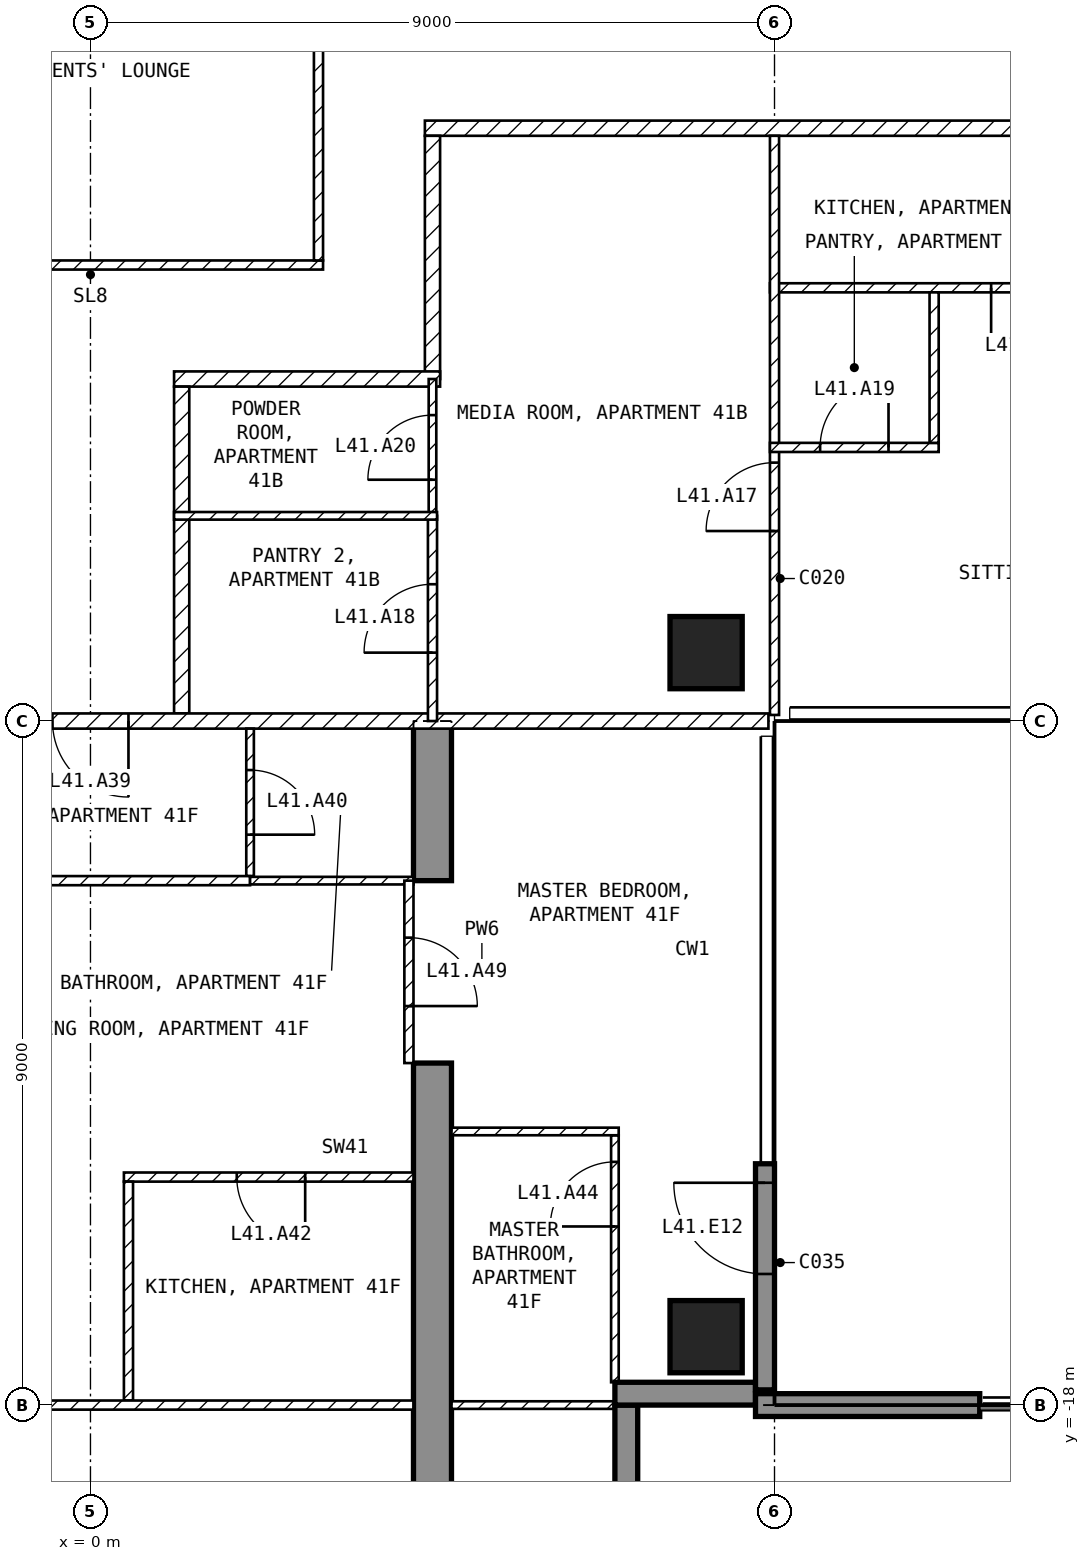
"""IFC4 building model, lengths in metres.
Left out: names, types, materials, properties, quantities, classifications, styles, units other than length and angle.
Written with IfcOpenShell. Run it as: python <this file> out.ifc"""

import sys

from ifc_helpers import new_model, si_unit, direction, frame, frame_2d, origin, origin_2d, place, context, subcontext, project, spatial, polyline, rectangle, outline, extrude, element, fill, save


model = new_model("IFC4")
c1 = context("Model", 3, precision=1e-05, world=origin(), true_north=direction((0.0, 1.0)))
c2 = subcontext(c1, "Body", "Model", "MODEL_VIEW")
j1 = project(units=[si_unit("LENGTHUNIT", "METRE"), si_unit("PLANEANGLEUNIT", "RADIAN")], contexts=[c1])
p1 = place(None, origin())
s1 = spatial("IfcSite", under=j1, at=p1, CompositionType="ELEMENT")
p2 = place(p1, origin())
s2 = spatial("IfcBuilding", under=s1, at=p2, CompositionType="ELEMENT")
p3 = place(p2, frame((0.0, 0.0, 170.1)))
s3 = spatial("IfcBuildingStorey", under=s2, at=p3, CompositionType="ELEMENT", Elevation=170.1)
for number, where, z_axis, x_axis in (
    (1, (8.1, -17.1, -0.25), (0.0, 0.0, 1.0), (1.0, 0.0, 0.0)),
    (2, (8.1, -8.1, -0.25), (0.0, 0.0, 1.0), (1.0, 0.0, 0.0)),
):
    element("IfcColumn", number, at=place(p3, frame(where, z_axis=z_axis, x_axis=x_axis)), inside=s3, PredefinedType="COLUMN", context=c2, shape_type="SweptSolid", body=[
        extrude(rectangle(XDim=0.95, YDim=0.95, at=origin_2d()), origin(), (0.0, 0.0, 1.0), 3.5),
    ])
p4 = place(p3, frame((4.25, -20.225, -0.25), z_axis=(1.0, 0.0, 0.0), x_axis=(0.0, 1.0, 0.0)))
e3 = element("IfcWall", 3, at=p4, inside=s3, PredefinedType="SHEAR", context=c2, shape_type="SweptSolid", body=[
    extrude(outline(polyline([(0.0, 0.0), (6.725, 0.0), (6.725, 2.65), (9.125, 2.65), (9.125, 0.0), (11.225, 0.0), (11.225, 3.5), (0.0, 3.5), (0.0, 0.0)])), origin(), (0.0, 0.0, 1.0), 0.5),
])
p5 = place(p3, frame((8.875, -17.8, 0.0), z_axis=(0.0, 0.0, 1.0), x_axis=(0.0, 1.0, 0.0)))
e4 = element("IfcWall", 4, at=p5, inside=s3, PredefinedType="SOLIDWALL", context=c2, shape_type="SweptSolid", body=[
    extrude(rectangle(XDim=2.975, YDim=0.25, at=frame_2d((1.488, 0.0))), origin(), (0.0, 0.0, 1.0), 3.25),
])
p6 = place(p5, frame((1.525, 0.0, 0.0)))
e5 = element("IfcOpeningElement", 5, at=p6, cuts=e4, PredefinedType="OPENING", context=c2, shape_type="SweptSolid", body=[
    extrude(rectangle(XDim=1.2, YDim=2.4, at=frame_2d((0.6, 1.2))), frame((0.0, 0.135, 0.0), z_axis=(0.0, -1.0, 0.0), x_axis=(1.0, 0.0, 0.0)), (0.0, 0.0, 1.0), 0.27),
])
p7 = place(p3, frame((7.05, -19.8, 0.0), z_axis=(0.0, 0.0, 1.0), x_axis=(0.0, 1.0, 0.0)))
e6 = element("IfcWall", 6, at=p7, inside=s3, PredefinedType="SOLIDWALL", context=c2, shape_type="SweptSolid", body=[
    extrude(rectangle(XDim=1.8, YDim=0.3, at=frame_2d((0.9, 0.0))), origin(), (0.0, 0.0, 1.0), 3.25),
])
p8 = place(p3, frame((6.9, -17.85, 0.0), z_axis=(0.0, 0.0, 1.0), x_axis=(1.0, 0.0, 0.0)))
e7 = element("IfcWall", 7, at=p8, inside=s3, PredefinedType="SOLIDWALL", context=c2, shape_type="SweptSolid", body=[
    extrude(rectangle(XDim=1.85, YDim=0.3, at=frame_2d((0.925, 0.0))), origin(), (0.0, 0.0, 1.0), 3.25),
])
p9 = place(p3, frame((8.75, -18.0, 0.0), z_axis=(0.0, 0.0, 1.0), x_axis=(1.0, 0.0, 0.0)))
e8 = element("IfcWall", 8, at=p9, inside=s3, PredefinedType="SOLIDWALL", context=c2, shape_type="SweptSolid", body=[
    extrude(rectangle(XDim=2.95, YDim=0.3, at=frame_2d((1.475, 0.0))), origin(), (0.0, 0.0, 1.0), 3.25),
])
p10 = place(p3, frame((-3.06, -3.0, 0.0), z_axis=(0.0, 0.0, 1.0), x_axis=(1.0, 0.0, 0.0)))
e9 = element("IfcWall", 9, at=p10, inside=s3, PredefinedType="PARTITIONING", context=c2, shape_type="SweptSolid", body=[
    extrude(rectangle(XDim=6.12, YDim=0.12, at=frame_2d((3.06, 0.0))), origin(), (0.0, 0.0, 1.0), 3.25),
])
p11 = place(p3, frame((3.0, -2.94, 0.0), z_axis=(0.0, 0.0, 1.0), x_axis=(0.0, 1.0, 0.0)))
e10 = element("IfcWall", 10, at=p11, inside=s3, PredefinedType="PARTITIONING", context=c2, shape_type="SweptSolid", body=[
    extrude(rectangle(XDim=5.88, YDim=0.12, at=frame_2d((2.94, 0.0))), origin(), (0.0, 0.0, 1.0), 3.25),
])
p12 = place(p3, frame((21.6, -1.2, 0.0), z_axis=(0.0, 0.0, 1.0), x_axis=(-1.0, 0.0, 0.0)))
e11 = element("IfcWall", 11, at=p12, inside=s3, PredefinedType="PARTITIONING", context=c2, shape_type="SweptSolid", body=[
    extrude(rectangle(XDim=17.2, YDim=0.2, at=frame_2d((8.6, 0.0))), origin(), (0.0, 0.0, 1.0), 3.25),
])
p13 = place(p12, frame((3.625, 0.0, 0.0)))
e12 = element("IfcOpeningElement", 12, at=p13, cuts=e11, PredefinedType="OPENING", context=c2, shape_type="SweptSolid", body=[
    extrude(rectangle(XDim=1.0, YDim=2.1, at=frame_2d((0.5, 1.05))), frame((0.0, 0.11, 0.0), z_axis=(0.0, -1.0, 0.0), x_axis=(1.0, 0.0, 0.0)), (0.0, 0.0, 1.0), 0.22),
])
p14 = place(p3, frame((4.5, -1.3, 0.0), z_axis=(0.0, 0.0, 1.0), x_axis=(0.0, -1.0, 0.0)))
e13 = element("IfcWall", 13, at=p14, inside=s3, PredefinedType="PARTITIONING", context=c2, shape_type="SweptSolid", body=[
    extrude(rectangle(XDim=3.2, YDim=0.2, at=frame_2d((1.6, 0.0))), origin(), (0.0, 0.0, 1.0), 3.25),
])
p15 = place(p3, frame((4.6, -4.5, 0.0), z_axis=(0.0, 0.0, 1.0), x_axis=(-1.0, 0.0, 0.0)))
e14 = element("IfcWall", 14, at=p15, inside=s3, PredefinedType="PARTITIONING", context=c2, shape_type="SweptSolid", body=[
    extrude(rectangle(XDim=3.5, YDim=0.2, at=frame_2d((1.75, 0.0))), origin(), (0.0, 0.0, 1.0), 3.25),
])
p16 = place(p3, frame((1.2, -4.6, 0.0), z_axis=(0.0, 0.0, 1.0), x_axis=(0.0, -1.0, 0.0)))
e15 = element("IfcWall", 15, at=p16, inside=s3, PredefinedType="PARTITIONING", context=c2, shape_type="SweptSolid", body=[
    extrude(rectangle(XDim=4.3, YDim=0.2, at=frame_2d((2.15, 0.0))), origin(), (0.0, 0.0, 1.0), 3.25),
])
p17 = place(p3, frame((8.92, -9.0, 0.0), z_axis=(0.0, 0.0, 1.0), x_axis=(-1.0, 0.0, 0.0)))
e16 = element("IfcWall", 16, at=p17, inside=s3, PredefinedType="PARTITIONING", context=c2, shape_type="SweptSolid", body=[
    extrude(rectangle(XDim=17.84, YDim=0.2, at=frame_2d((8.92, 0.0))), origin(), (0.0, 0.0, 1.0), 3.25),
])
p18 = place(p17, frame((8.42, 0.0, 0.0)))
e17 = element("IfcOpeningElement", 17, at=p18, cuts=e16, PredefinedType="OPENING", context=c2, shape_type="SweptSolid", body=[
    extrude(rectangle(XDim=1.0, YDim=2.1, at=frame_2d((0.5, 1.05))), frame((0.0, 0.11, 0.0), z_axis=(0.0, -1.0, 0.0), x_axis=(1.0, 0.0, 0.0)), (0.0, 0.0, 1.0), 0.22),
])
p19 = place(p3, frame((18.75, -3.3, 0.0), z_axis=(0.0, 0.0, 1.0), x_axis=(-1.0, 0.0, 0.0)))
e18 = element("IfcWall", 18, at=p19, inside=s3, PredefinedType="PARTITIONING", context=c2, shape_type="SweptSolid", body=[
    extrude(rectangle(XDim=9.81, YDim=0.12, at=frame_2d((4.905, 0.0))), origin(), (0.0, 0.0, 1.0), 3.25),
])
p20 = place(p19, frame((6.0, 0.0, 0.0)))
e19 = element("IfcOpeningElement", 19, at=p20, cuts=e18, PredefinedType="OPENING", context=c2, shape_type="SweptSolid", body=[
    extrude(rectangle(XDim=0.9, YDim=2.1, at=frame_2d((0.45, 1.05))), frame((0.0, 0.07, 0.0), z_axis=(0.0, -1.0, 0.0), x_axis=(1.0, 0.0, 0.0)), (0.0, 0.0, 1.0), 0.14),
])
p21 = place(p19, frame((1.2, 0.0, 0.0)))
e20 = element("IfcOpeningElement", 20, at=p21, cuts=e18, PredefinedType="OPENING", context=c2, shape_type="SweptSolid", body=[
    extrude(rectangle(XDim=0.9, YDim=2.1, at=frame_2d((0.45, 1.05))), frame((0.0, 0.07, 0.0), z_axis=(0.0, -1.0, 0.0), x_axis=(1.0, 0.0, 0.0)), (0.0, 0.0, 1.0), 0.14),
])
p22 = place(p3, frame((9.0, -8.92, 0.0), z_axis=(0.0, 0.0, 1.0), x_axis=(0.0, 1.0, 0.0)))
e21 = element("IfcWall", 21, at=p22, inside=s3, PredefinedType="PARTITIONING", context=c2, shape_type="SweptSolid", body=[
    extrude(rectangle(XDim=7.62, YDim=0.12, at=frame_2d((3.81, 0.0))), origin(), (0.0, 0.0, 1.0), 3.25),
])
p23 = place(p22, frame((2.42, 0.0, 0.0)))
e22 = element("IfcOpeningElement", 22, at=p23, cuts=e21, PredefinedType="OPENING", context=c2, shape_type="SweptSolid", body=[
    extrude(rectangle(XDim=0.9, YDim=2.1, at=frame_2d((0.45, 1.05))), frame((0.0, 0.07, 0.0), z_axis=(0.0, -1.0, 0.0), x_axis=(1.0, 0.0, 0.0)), (0.0, 0.0, 1.0), 0.14),
])
p24 = place(p3, frame((8.94, -5.4, 0.0), z_axis=(0.0, 0.0, 1.0), x_axis=(1.0, 0.0, 0.0)))
e23 = element("IfcWall", 23, at=p24, inside=s3, PredefinedType="PARTITIONING", context=c2, shape_type="SweptSolid", body=[
    extrude(rectangle(XDim=2.22, YDim=0.12, at=frame_2d((1.11, 0.0))), origin(), (0.0, 0.0, 1.0), 3.25),
])
p25 = place(p24, frame((0.66, 0.0, 0.0)))
e24 = element("IfcOpeningElement", 24, at=p25, cuts=e23, PredefinedType="OPENING", context=c2, shape_type="SweptSolid", body=[
    extrude(rectangle(XDim=0.9, YDim=2.1, at=frame_2d((0.45, 1.05))), frame((0.0, 0.07, 0.0), z_axis=(0.0, -1.0, 0.0), x_axis=(1.0, 0.0, 0.0)), (0.0, 0.0, 1.0), 0.14),
])
p26 = place(p3, frame((11.1, -5.34, 0.0), z_axis=(0.0, 0.0, 1.0), x_axis=(0.0, 1.0, 0.0)))
e25 = element("IfcWall", 25, at=p26, inside=s3, PredefinedType="PARTITIONING", context=c2, shape_type="SweptSolid", body=[
    extrude(rectangle(XDim=1.98, YDim=0.12, at=frame_2d((0.99, 0.0))), origin(), (0.0, 0.0, 1.0), 3.25),
])
p27 = place(p3, frame((4.5, -6.3, 0.0), z_axis=(0.0, 0.0, 1.0), x_axis=(0.0, 1.0, 0.0)))
e26 = element("IfcWall", 26, at=p27, inside=s3, PredefinedType="PARTITIONING", context=c2, shape_type="SweptSolid", body=[
    extrude(rectangle(XDim=1.8, YDim=0.1, at=frame_2d((0.9, 0.0))), origin(), (0.0, 0.0, 1.0), 3.25),
])
p28 = place(p27, frame((0.475, 0.0, 0.0)))
e27 = element("IfcOpeningElement", 27, at=p28, cuts=e26, PredefinedType="OPENING", context=c2, shape_type="SweptSolid", body=[
    extrude(rectangle(XDim=0.85, YDim=2.1, at=frame_2d((0.425, 1.05))), frame((0.0, 0.06, 0.0), z_axis=(0.0, -1.0, 0.0), x_axis=(1.0, 0.0, 0.0)), (0.0, 0.0, 1.0), 0.12),
])
p29 = place(p3, frame((4.5, -9.0, 0.0), z_axis=(0.0, 0.0, 1.0), x_axis=(0.0, 1.0, 0.0)))
e28 = element("IfcWall", 28, at=p29, inside=s3, PredefinedType="PARTITIONING", context=c2, shape_type="SweptSolid", body=[
    extrude(rectangle(XDim=2.7, YDim=0.12, at=frame_2d((1.35, 0.0))), origin(), (0.0, 0.0, 1.0), 3.25),
])
p30 = place(p29, frame((0.9, 0.0, 0.0)))
e29 = element("IfcOpeningElement", 29, at=p30, cuts=e28, PredefinedType="OPENING", context=c2, shape_type="SweptSolid", body=[
    extrude(rectangle(XDim=0.9, YDim=2.1, at=frame_2d((0.45, 1.05))), frame((0.0, 0.07, 0.0), z_axis=(0.0, -1.0, 0.0), x_axis=(1.0, 0.0, 0.0)), (0.0, 0.0, 1.0), 0.14),
])
p31 = place(p3, frame((4.56, -6.3, 0.0), z_axis=(0.0, 0.0, 1.0), x_axis=(-1.0, 0.0, 0.0)))
e30 = element("IfcWall", 30, at=p31, inside=s3, PredefinedType="PARTITIONING", context=c2, shape_type="SweptSolid", body=[
    extrude(rectangle(XDim=3.46, YDim=0.1, at=frame_2d((1.73, 0.0))), origin(), (0.0, 0.0, 1.0), 3.25),
])
p32 = place(p3, frame((2.1, -9.1, 0.0), z_axis=(0.0, 0.0, 1.0), x_axis=(0.0, -1.0, 0.0)))
e31 = element("IfcWall", 31, at=p32, inside=s3, PredefinedType="PARTITIONING", context=c2, shape_type="SweptSolid", body=[
    extrude(rectangle(XDim=1.94, YDim=0.1, at=frame_2d((0.97, 0.0))), origin(), (0.0, 0.0, 1.0), 3.25),
])
p33 = place(p32, frame((0.545, 0.0, 0.0)))
e32 = element("IfcOpeningElement", 32, at=p33, cuts=e31, PredefinedType="OPENING", context=c2, shape_type="SweptSolid", body=[
    extrude(rectangle(XDim=0.85, YDim=2.1, at=frame_2d((0.425, 1.05))), frame((0.0, 0.06, 0.0), z_axis=(0.0, -1.0, 0.0), x_axis=(1.0, 0.0, 0.0)), (0.0, 0.0, 1.0), 0.12),
])
p34 = place(p3, frame((2.1, -11.1, 0.0), z_axis=(0.0, 0.0, 1.0), x_axis=(-1.0, 0.0, 0.0)))
e33 = element("IfcWall", 33, at=p34, inside=s3, PredefinedType="PARTITIONING", context=c2, shape_type="SweptSolid", body=[
    extrude(rectangle(XDim=6.35, YDim=0.12, at=frame_2d((3.175, 0.0))), origin(), (0.0, 0.0, 1.0), 3.25),
])
p35 = place(p34, frame((2.725, 0.0, 0.0)))
e34 = element("IfcOpeningElement", 34, at=p35, cuts=e33, PredefinedType="OPENING", context=c2, shape_type="SweptSolid", body=[
    extrude(rectangle(XDim=0.9, YDim=2.1, at=frame_2d((0.45, 1.05))), frame((0.0, 0.07, 0.0), z_axis=(0.0, -1.0, 0.0), x_axis=(1.0, 0.0, 0.0)), (0.0, 0.0, 1.0), 0.14),
])
p36 = place(p3, frame((4.25, -11.1, 0.0), z_axis=(0.0, 0.0, 1.0), x_axis=(-1.0, 0.0, 0.0)))
e35 = element("IfcWall", 35, at=p36, inside=s3, PredefinedType="PARTITIONING", context=c2, shape_type="SweptSolid", body=[
    extrude(rectangle(XDim=2.15, YDim=0.1, at=frame_2d((1.075, 0.0))), origin(), (0.0, 0.0, 1.0), 3.25),
])
p37 = place(p3, frame((4.25, -15.0, 0.0), z_axis=(0.0, 0.0, 1.0), x_axis=(-1.0, 0.0, 0.0)))
e36 = element("IfcWall", 36, at=p37, inside=s3, PredefinedType="PARTITIONING", context=c2, shape_type="SweptSolid", body=[
    extrude(rectangle(XDim=3.81, YDim=0.12, at=frame_2d((1.905, 0.0))), origin(), (0.0, 0.0, 1.0), 3.25),
])
p38 = place(p37, frame((1.425, 0.0, 0.0)))
e37 = element("IfcOpeningElement", 37, at=p38, cuts=e36, PredefinedType="OPENING", context=c2, shape_type="SweptSolid", body=[
    extrude(rectangle(XDim=0.9, YDim=2.1, at=frame_2d((0.45, 1.05))), frame((0.0, 0.07, 0.0), z_axis=(0.0, -1.0, 0.0), x_axis=(1.0, 0.0, 0.0)), (0.0, 0.0, 1.0), 0.14),
])
p39 = place(p3, frame((0.5, -15.06, 0.0), z_axis=(0.0, 0.0, 1.0), x_axis=(0.0, -1.0, 0.0)))
e38 = element("IfcWall", 38, at=p39, inside=s3, PredefinedType="PARTITIONING", context=c2, shape_type="SweptSolid", body=[
    extrude(rectangle(XDim=2.88, YDim=0.12, at=frame_2d((1.44, 0.0))), origin(), (0.0, 0.0, 1.0), 3.25),
])
p40 = place(p3, frame((4.25, -18.0, 0.0), z_axis=(0.0, 0.0, 1.0), x_axis=(-1.0, 0.0, 0.0)))
e39 = element("IfcWall", 39, at=p40, inside=s3, PredefinedType="PARTITIONING", context=c2, shape_type="SweptSolid", body=[
    extrude(rectangle(XDim=8.5, YDim=0.12, at=frame_2d((4.25, 0.0))), origin(), (0.0, 0.0, 1.0), 3.25),
])
p41 = place(p40, frame((5.675, 0.0, 0.0)))
e40 = element("IfcOpeningElement", 40, at=p41, cuts=e39, PredefinedType="OPENING", context=c2, shape_type="SweptSolid", body=[
    extrude(rectangle(XDim=0.9, YDim=2.1, at=frame_2d((0.45, 1.05))), frame((0.0, 0.07, 0.0), z_axis=(0.0, -1.0, 0.0), x_axis=(1.0, 0.0, 0.0)), (0.0, 0.0, 1.0), 0.14),
])
p42 = place(p3, frame((6.9, -17.7, 0.0), z_axis=(0.0, 0.0, 1.0), x_axis=(0.0, 1.0, 0.0)))
e41 = element("IfcWall", 41, at=p42, inside=s3, PredefinedType="PARTITIONING", context=c2, shape_type="SweptSolid", body=[
    extrude(rectangle(XDim=3.25, YDim=0.1, at=frame_2d((1.625, 0.0))), origin(), (0.0, 0.0, 1.0), 3.25),
])
p43 = place(p42, frame((2.05, 0.0, 0.0)))
e42 = element("IfcOpeningElement", 42, at=p43, cuts=e41, PredefinedType="OPENING", context=c2, shape_type="SweptSolid", body=[
    extrude(rectangle(XDim=0.85, YDim=2.1, at=frame_2d((0.425, 1.05))), frame((0.0, 0.06, 0.0), z_axis=(0.0, -1.0, 0.0), x_axis=(1.0, 0.0, 0.0)), (0.0, 0.0, 1.0), 0.12),
])
p44 = place(p3, frame((6.95, -14.4, 0.0), z_axis=(0.0, 0.0, 1.0), x_axis=(-1.0, 0.0, 0.0)))
e43 = element("IfcWall", 43, at=p44, inside=s3, PredefinedType="PARTITIONING", context=c2, shape_type="SweptSolid", body=[
    extrude(rectangle(XDim=2.2, YDim=0.1, at=frame_2d((1.1, 0.0))), origin(), (0.0, 0.0, 1.0), 3.25),
])
p45 = place(p3, frame((7.12, -18.0, 0.0), z_axis=(0.0, 0.0, 1.0), x_axis=(-1.0, 0.0, 0.0)))
e44 = element("IfcWall", 44, at=p45, inside=s3, PredefinedType="PARTITIONING", context=c2, shape_type="SweptSolid", body=[
    extrude(rectangle(XDim=2.37, YDim=0.1, at=frame_2d((1.185, 0.0))), origin(), (0.0, 0.0, 1.0), 3.25),
])
p46 = place(p3, frame((4.19, -11.1, 0.0), z_axis=(0.0, 0.0, 1.0), x_axis=(0.0, -1.0, 0.0)))
e45 = element("IfcWall", 45, at=p46, inside=s3, PredefinedType="PARTITIONING", context=c2, shape_type="SweptSolid", body=[
    extrude(rectangle(XDim=2.4, YDim=0.12, at=frame_2d((1.2, 0.0))), origin(), (0.0, 0.0, 1.0), 2.4),
])
p47 = place(p46, frame((0.75, 0.0, 0.0)))
e46 = element("IfcOpeningElement", 46, at=p47, cuts=e45, PredefinedType="OPENING", context=c2, shape_type="SweptSolid", body=[
    extrude(rectangle(XDim=0.9, YDim=2.1, at=frame_2d((0.45, 1.05))), frame((0.0, 0.07, 0.0), z_axis=(0.0, -1.0, 0.0), x_axis=(1.0, 0.0, 0.0)), (0.0, 0.0, 1.0), 0.14),
])
p48 = place(p6, origin())
e47 = element("IfcDoor", 47, at=p48, inside=s3, OperationType="SINGLE_SWING_RIGHT", PredefinedType="DOOR", context=c2, shape_type="SweptSolid", body=[
    extrude(rectangle(XDim=1.2, YDim=2.4, at=frame_2d((0.6, 1.2))), frame((0.0, 0.025, 0.0), z_axis=(0.0, -1.0, 0.0), x_axis=(1.0, 0.0, 0.0)), (0.0, 0.0, 1.0), 0.05),
])
fill(e5, e47)
p49 = place(p20, origin())
e48 = element("IfcDoor", 48, at=p49, inside=s3, OperationType="SINGLE_SWING_RIGHT", PredefinedType="DOOR", context=c2, shape_type="SweptSolid", body=[
    extrude(rectangle(XDim=0.9, YDim=2.1, at=frame_2d((0.45, 1.05))), frame((0.0, 0.025, 0.0), z_axis=(0.0, -1.0, 0.0), x_axis=(1.0, 0.0, 0.0)), (0.0, 0.0, 1.0), 0.05),
])
fill(e19, e48)
p50 = place(p23, origin())
e49 = element("IfcDoor", 49, at=p50, inside=s3, OperationType="SINGLE_SWING_LEFT", PredefinedType="DOOR", context=c2, shape_type="SweptSolid", body=[
    extrude(rectangle(XDim=0.9, YDim=2.1, at=frame_2d((0.45, 1.05))), frame((0.0, 0.025, 0.0), z_axis=(0.0, -1.0, 0.0), x_axis=(1.0, 0.0, 0.0)), (0.0, 0.0, 1.0), 0.05),
])
fill(e22, e49)
p51 = place(p30, origin())
e50 = element("IfcDoor", 50, at=p51, inside=s3, OperationType="SINGLE_SWING_LEFT", PredefinedType="DOOR", context=c2, shape_type="SweptSolid", body=[
    extrude(rectangle(XDim=0.9, YDim=2.1, at=frame_2d((0.45, 1.05))), frame((0.0, 0.025, 0.0), z_axis=(0.0, -1.0, 0.0), x_axis=(1.0, 0.0, 0.0)), (0.0, 0.0, 1.0), 0.05),
])
fill(e29, e50)
p52 = place(p25, origin())
e51 = element("IfcDoor", 51, at=p52, inside=s3, OperationType="SINGLE_SWING_RIGHT", PredefinedType="DOOR", context=c2, shape_type="SweptSolid", body=[
    extrude(rectangle(XDim=0.9, YDim=2.1, at=frame_2d((0.45, 1.05))), frame((0.0, 0.025, 0.0), z_axis=(0.0, -1.0, 0.0), x_axis=(1.0, 0.0, 0.0)), (0.0, 0.0, 1.0), 0.05),
])
fill(e24, e51)
p53 = place(p28, origin())
e52 = element("IfcDoor", 52, at=p53, inside=s3, OperationType="SINGLE_SWING_LEFT", PredefinedType="DOOR", context=c2, shape_type="SweptSolid", body=[
    extrude(rectangle(XDim=0.85, YDim=2.1, at=frame_2d((0.425, 1.05))), frame((0.0, 0.025, 0.0), z_axis=(0.0, -1.0, 0.0), x_axis=(1.0, 0.0, 0.0)), (0.0, 0.0, 1.0), 0.05),
])
fill(e27, e52)
p54 = place(p18, origin())
e53 = element("IfcDoor", 53, at=p54, inside=s3, OperationType="SINGLE_SWING_LEFT", PredefinedType="DOOR", context=c2, shape_type="SweptSolid", body=[
    extrude(rectangle(XDim=1.0, YDim=2.1, at=frame_2d((0.5, 1.05))), frame((0.0, 0.025, 0.0), z_axis=(0.0, -1.0, 0.0), x_axis=(1.0, 0.0, 0.0)), (0.0, 0.0, 1.0), 0.05),
])
fill(e17, e53)
p55 = place(p33, origin())
e54 = element("IfcDoor", 54, at=p55, inside=s3, OperationType="SINGLE_SWING_RIGHT", PredefinedType="DOOR", context=c2, shape_type="SweptSolid", body=[
    extrude(rectangle(XDim=0.85, YDim=2.1, at=frame_2d((0.425, 1.05))), frame((0.0, 0.025, 0.0), z_axis=(0.0, -1.0, 0.0), x_axis=(1.0, 0.0, 0.0)), (0.0, 0.0, 1.0), 0.05),
])
fill(e32, e54)
p56 = place(p38, origin())
e55 = element("IfcDoor", 55, at=p56, inside=s3, OperationType="SINGLE_SWING_LEFT", PredefinedType="DOOR", context=c2, shape_type="SweptSolid", body=[
    extrude(rectangle(XDim=0.9, YDim=2.1, at=frame_2d((0.45, 1.05))), frame((0.0, 0.025, 0.0), z_axis=(0.0, -1.0, 0.0), x_axis=(1.0, 0.0, 0.0)), (0.0, 0.0, 1.0), 0.05),
])
fill(e37, e55)
p57 = place(p43, origin())
e56 = element("IfcDoor", 56, at=p57, inside=s3, OperationType="SINGLE_SWING_LEFT", PredefinedType="DOOR", context=c2, shape_type="SweptSolid", body=[
    extrude(rectangle(XDim=0.85, YDim=2.1, at=frame_2d((0.425, 1.05))), frame((0.0, 0.025, 0.0), z_axis=(0.0, -1.0, 0.0), x_axis=(1.0, 0.0, 0.0)), (0.0, 0.0, 1.0), 0.05),
])
fill(e42, e56)
p58 = place(p47, origin())
e57 = element("IfcDoor", 57, at=p58, inside=s3, OperationType="SINGLE_SWING_RIGHT", PredefinedType="DOOR", context=c2, shape_type="SweptSolid", body=[
    extrude(rectangle(XDim=0.9, YDim=2.1, at=frame_2d((0.45, 1.05))), frame((0.0, 0.025, 0.0), z_axis=(0.0, -1.0, 0.0), x_axis=(1.0, 0.0, 0.0)), (0.0, 0.0, 1.0), 0.05),
])
fill(e46, e57)
save(model, sys.argv[1])
